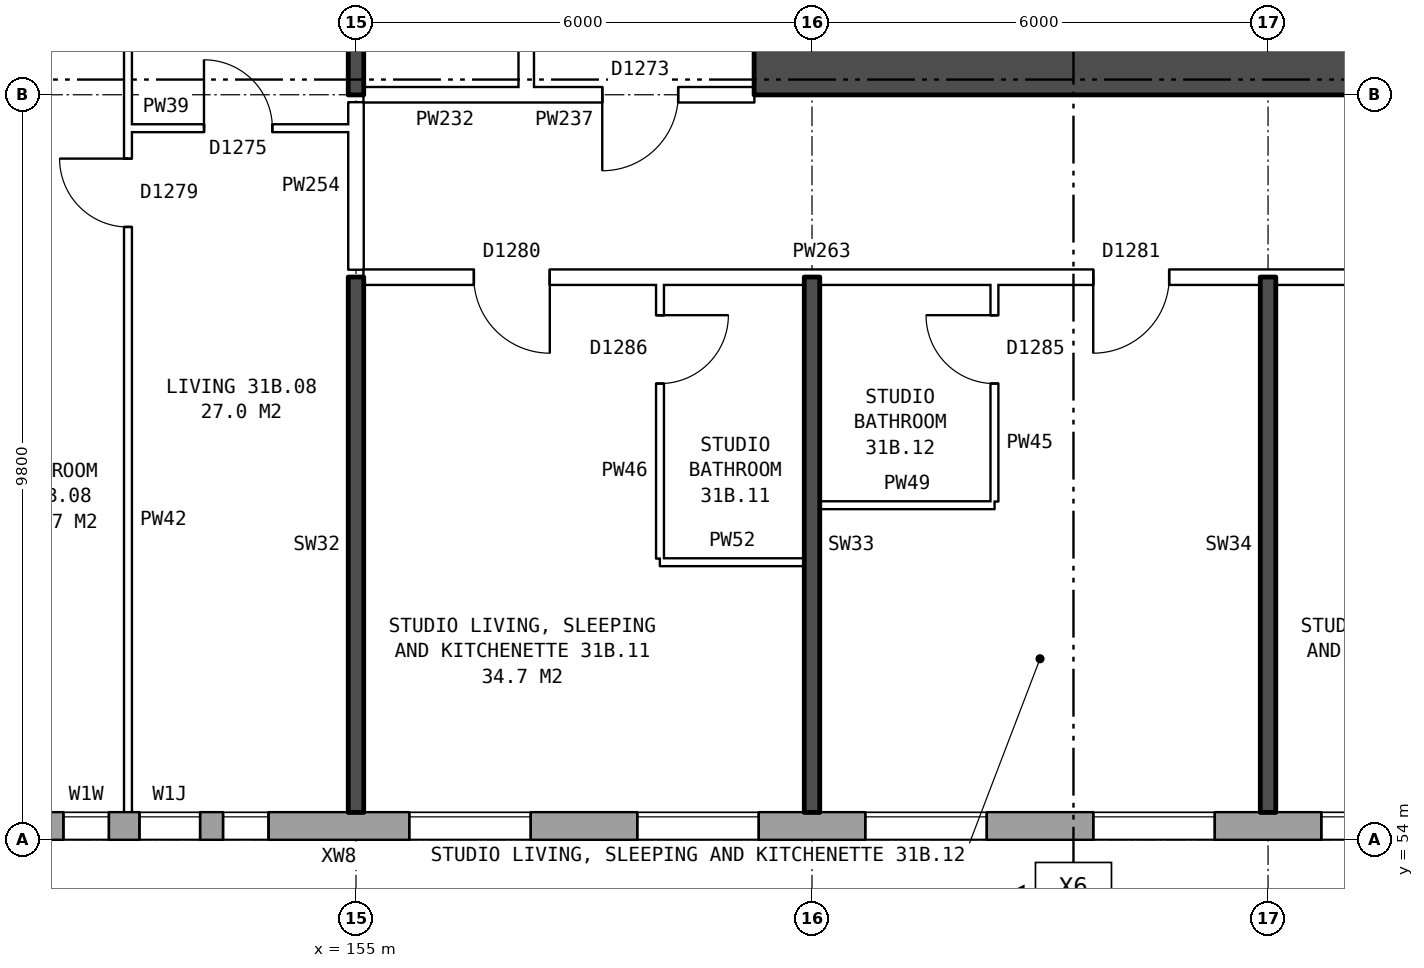
"""IFC4 building model, lengths in metres.
Left out: names, types, materials, properties, quantities, classifications, styles, units other than length and angle.
Written with IfcOpenShell. Run it as: python <this file> out.ifc"""

import sys

from ifc_helpers import new_model, si_unit, direction, frame, frame_2d, origin, place, context, subcontext, project, spatial, rectangle, extrude, element, fill, save


model = new_model("IFC4")
c1 = context("Model", 3, precision=1e-05, world=origin(), true_north=direction((0.0, 1.0)))
c2 = subcontext(c1, "Body", "Model", "MODEL_VIEW")
j1 = project(units=[si_unit("LENGTHUNIT", "METRE"), si_unit("PLANEANGLEUNIT", "RADIAN")], contexts=[c1])
p1 = place(None, origin())
s1 = spatial("IfcSite", under=j1, at=p1, CompositionType="ELEMENT")
p2 = place(p1, origin())
s2 = spatial("IfcBuilding", under=s1, at=p2, CompositionType="ELEMENT")
p3 = place(p2, frame((0.0, 0.0, 111.9)))
s3 = spatial("IfcBuildingStorey", under=s2, at=p3, CompositionType="ELEMENT", Elevation=111.9)
p4 = place(p3, frame((134.075, 54.18, 0.0), z_axis=(0.0, 0.0, 1.0), x_axis=(1.0, 0.0, 0.0)))
e1 = element("IfcWall", 1, at=p4, inside=s3, PredefinedType="STANDARD", context=c2, shape_type="SweptSolid", body=[
    extrude(rectangle(XDim=36.851, YDim=0.36, at=frame_2d((18.425, 0.0))), origin(), (0.0, 0.0, 1.0), 2.85),
])
p5 = place(p4, frame((0.625, 0.0, 0.8)))
e2 = element("IfcOpeningElement", 2, at=p5, cuts=e1, PredefinedType="OPENING", context=c2, shape_type="SweptSolid", body=[
    extrude(rectangle(XDim=1.6, YDim=1.8, at=frame_2d((0.8, 0.9))), frame((0.0, 0.19, 0.0), z_axis=(0.0, -1.0, 0.0), x_axis=(1.0, 0.0, 0.0)), (0.0, 0.0, 1.0), 0.38),
])
p6 = place(p4, frame((3.625, 0.0, 0.8)))
e3 = element("IfcOpeningElement", 3, at=p6, cuts=e1, PredefinedType="OPENING", context=c2, shape_type="SweptSolid", body=[
    extrude(rectangle(XDim=1.6, YDim=1.8, at=frame_2d((0.8, 0.9))), frame((0.0, 0.19, 0.0), z_axis=(0.0, -1.0, 0.0), x_axis=(1.0, 0.0, 0.0)), (0.0, 0.0, 1.0), 0.38),
])
p7 = place(p4, frame((6.625, 0.0, 0.8)))
e4 = element("IfcOpeningElement", 4, at=p7, cuts=e1, PredefinedType="OPENING", context=c2, shape_type="SweptSolid", body=[
    extrude(rectangle(XDim=1.6, YDim=1.8, at=frame_2d((0.8, 0.9))), frame((0.0, 0.19, 0.0), z_axis=(0.0, -1.0, 0.0), x_axis=(1.0, 0.0, 0.0)), (0.0, 0.0, 1.0), 0.38),
])
p8 = place(p4, frame((9.625, 0.0, 0.8)))
e5 = element("IfcOpeningElement", 5, at=p8, cuts=e1, PredefinedType="OPENING", context=c2, shape_type="SweptSolid", body=[
    extrude(rectangle(XDim=1.6, YDim=1.8, at=frame_2d((0.8, 0.9))), frame((0.0, 0.19, 0.0), z_axis=(0.0, -1.0, 0.0), x_axis=(1.0, 0.0, 0.0)), (0.0, 0.0, 1.0), 0.38),
])
p9 = place(p4, frame((12.625, 0.0, 0.8)))
e6 = element("IfcOpeningElement", 6, at=p9, cuts=e1, PredefinedType="OPENING", context=c2, shape_type="SweptSolid", body=[
    extrude(rectangle(XDim=1.6, YDim=1.8, at=frame_2d((0.8, 0.9))), frame((0.0, 0.19, 0.0), z_axis=(0.0, -1.0, 0.0), x_axis=(1.0, 0.0, 0.0)), (0.0, 0.0, 1.0), 0.38),
])
p10 = place(p4, frame((15.125, 0.0, 1.35)))
e7 = element("IfcOpeningElement", 7, at=p10, cuts=e1, PredefinedType="OPENING", context=c2, shape_type="SweptSolid", body=[
    extrude(rectangle(XDim=1.2, YDim=1.2, at=frame_2d((0.6, 0.6))), frame((0.0, 0.19, 0.0), z_axis=(0.0, -1.0, 0.0), x_axis=(1.0, 0.0, 0.0)), (0.0, 0.0, 1.0), 0.38),
])
p11 = place(p4, frame((18.075, 0.0, 0.25)))
e8 = element("IfcOpeningElement", 8, at=p11, cuts=e1, PredefinedType="OPENING", context=c2, shape_type="SweptSolid", body=[
    extrude(rectangle(XDim=0.8, YDim=1.5, at=frame_2d((0.4, 0.75))), frame((0.0, 0.19, 0.0), z_axis=(0.0, -1.0, 0.0), x_axis=(1.0, 0.0, 0.0)), (0.0, 0.0, 1.0), 0.38),
])
p12 = place(p4, frame((21.625, 0.0, 0.8)))
e9 = element("IfcOpeningElement", 9, at=p12, cuts=e1, PredefinedType="OPENING", context=c2, shape_type="SweptSolid", body=[
    extrude(rectangle(XDim=1.6, YDim=1.8, at=frame_2d((0.8, 0.9))), frame((0.0, 0.19, 0.0), z_axis=(0.0, -1.0, 0.0), x_axis=(1.0, 0.0, 0.0)), (0.0, 0.0, 1.0), 0.38),
])
p13 = place(p4, frame((24.625, 0.0, 0.8)))
e10 = element("IfcOpeningElement", 10, at=p13, cuts=e1, PredefinedType="OPENING", context=c2, shape_type="SweptSolid", body=[
    extrude(rectangle(XDim=1.6, YDim=1.8, at=frame_2d((0.8, 0.9))), frame((0.0, 0.19, 0.0), z_axis=(0.0, -1.0, 0.0), x_axis=(1.0, 0.0, 0.0)), (0.0, 0.0, 1.0), 0.38),
])
p14 = place(p4, frame((27.625, 0.0, 0.8)))
e11 = element("IfcOpeningElement", 11, at=p14, cuts=e1, PredefinedType="OPENING", context=c2, shape_type="SweptSolid", body=[
    extrude(rectangle(XDim=1.6, YDim=1.8, at=frame_2d((0.8, 0.9))), frame((0.0, 0.19, 0.0), z_axis=(0.0, -1.0, 0.0), x_axis=(1.0, 0.0, 0.0)), (0.0, 0.0, 1.0), 0.38),
])
p15 = place(p4, frame((30.625, 0.0, 0.8)))
e12 = element("IfcOpeningElement", 12, at=p15, cuts=e1, PredefinedType="OPENING", context=c2, shape_type="SweptSolid", body=[
    extrude(rectangle(XDim=1.6, YDim=1.8, at=frame_2d((0.8, 0.9))), frame((0.0, 0.19, 0.0), z_axis=(0.0, -1.0, 0.0), x_axis=(1.0, 0.0, 0.0)), (0.0, 0.0, 1.0), 0.38),
])
p16 = place(p4, frame((33.625, 0.0, 0.8)))
e13 = element("IfcOpeningElement", 13, at=p16, cuts=e1, PredefinedType="OPENING", context=c2, shape_type="SweptSolid", body=[
    extrude(rectangle(XDim=1.6, YDim=1.8, at=frame_2d((0.8, 0.9))), frame((0.0, 0.19, 0.0), z_axis=(0.0, -1.0, 0.0), x_axis=(1.0, 0.0, 0.0)), (0.0, 0.0, 1.0), 0.38),
])
p17 = place(p4, frame((17.075, 0.0, 0.15)))
e14 = element("IfcOpeningElement", 14, at=p17, cuts=e1, PredefinedType="OPENING", context=c2, shape_type="SweptSolid", body=[
    extrude(rectangle(XDim=0.6, YDim=0.9, at=frame_2d((0.3, 0.45))), frame((0.0, 0.19, 0.0), z_axis=(0.0, -1.0, 0.0), x_axis=(1.0, 0.0, 0.0)), (0.0, 0.0, 1.0), 0.38),
])
p18 = place(p4, frame((19.175, 0.0, 0.15)))
e15 = element("IfcOpeningElement", 15, at=p18, cuts=e1, PredefinedType="OPENING", context=c2, shape_type="SweptSolid", body=[
    extrude(rectangle(XDim=0.6, YDim=0.9, at=frame_2d((0.3, 0.45))), frame((0.0, 0.19, 0.0), z_axis=(0.0, -1.0, 0.0), x_axis=(1.0, 0.0, 0.0)), (0.0, 0.0, 1.0), 0.38),
])
p19 = place(p3, frame((160.24, 64.125, 0.0), z_axis=(0.0, 0.0, 1.0), x_axis=(1.0, 0.0, 0.0)))
e16 = element("IfcWall", 16, at=p19, inside=s3, PredefinedType="SHEAR", context=c2, shape_type="SweptSolid", body=[
    extrude(rectangle(XDim=8.4, YDim=0.65, at=frame_2d((4.2, 0.0))), origin(), (0.0, 0.0, 1.0), 2.85),
])
p20 = place(p3, frame((157.24, 63.9, 0.0), z_axis=(0.0, 0.0, 1.0), x_axis=(0.0, 1.0, 0.0)))
e17 = element("IfcWall", 17, at=p20, inside=s3, PredefinedType="PARTITIONING", context=c2, shape_type="SweptSolid", body=[
    extrude(rectangle(XDim=12.2, YDim=0.2, at=frame_2d((6.1, 0.0))), origin(), (0.0, 0.0, 1.0), 2.85),
])
p21 = place(p20, frame((5.1, 0.0, 0.0)))
e18 = element("IfcOpeningElement", 18, at=p21, cuts=e17, PredefinedType="OPENING", context=c2, shape_type="SweptSolid", body=[
    extrude(rectangle(XDim=2.0, YDim=2.1, at=frame_2d((1.0, 1.05))), frame((0.0, 0.11, 0.0), z_axis=(0.0, -1.0, 0.0), x_axis=(1.0, 0.0, 0.0)), (0.0, 0.0, 1.0), 0.22),
])
p22 = place(p3, frame((159.0, 57.65, 0.0), z_axis=(0.0, 0.0, 1.0), x_axis=(1.0, 0.0, 0.0)))
e19 = element("IfcWall", 19, at=p22, inside=s3, PredefinedType="PARTITIONING", context=c2, shape_type="SweptSolid", body=[
    extrude(rectangle(XDim=1.9, YDim=0.1, at=frame_2d((0.95, 0.0))), origin(), (0.0, 0.0, 1.0), 2.85),
])
p23 = place(p3, frame((161.1, 58.4, 0.0), z_axis=(0.0, 0.0, 1.0), x_axis=(1.0, 0.0, 0.0)))
e20 = element("IfcWall", 20, at=p23, inside=s3, PredefinedType="PARTITIONING", context=c2, shape_type="SweptSolid", body=[
    extrude(rectangle(XDim=2.3, YDim=0.1, at=frame_2d((1.15, 0.0))), origin(), (0.0, 0.0, 1.0), 2.85),
])
p24 = place(p3, frame((155.1, 61.4, 0.0), z_axis=(0.0, 0.0, 1.0), x_axis=(1.0, 0.0, 0.0)))
e21 = element("IfcWall", 21, at=p24, inside=s3, PredefinedType="PARTITIONING", context=c2, shape_type="SweptSolid", body=[
    extrude(rectangle(XDim=18.54, YDim=0.2, at=frame_2d((9.27, 0.0))), origin(), (0.0, 0.0, 1.0), 2.85),
])
p25 = place(p24, frame((1.45, 0.0, 0.0)))
e22 = element("IfcOpeningElement", 22, at=p25, cuts=e21, PredefinedType="OPENING", context=c2, shape_type="SweptSolid", body=[
    extrude(rectangle(XDim=1.0, YDim=2.1, at=frame_2d((0.5, 1.05))), frame((0.0, 0.11, 0.0), z_axis=(0.0, -1.0, 0.0), x_axis=(1.0, 0.0, 0.0)), (0.0, 0.0, 1.0), 0.22),
])
p26 = place(p24, frame((9.6, 0.0, 0.0)))
e23 = element("IfcOpeningElement", 23, at=p26, cuts=e21, PredefinedType="OPENING", context=c2, shape_type="SweptSolid", body=[
    extrude(rectangle(XDim=1.0, YDim=2.1, at=frame_2d((0.5, 1.05))), frame((0.0, 0.11, 0.0), z_axis=(0.0, -1.0, 0.0), x_axis=(1.0, 0.0, 0.0)), (0.0, 0.0, 1.0), 0.22),
])
p27 = place(p24, frame((13.4, 0.0, 0.0)))
e24 = element("IfcOpeningElement", 24, at=p27, cuts=e21, PredefinedType="OPENING", context=c2, shape_type="SweptSolid", body=[
    extrude(rectangle(XDim=1.0, YDim=2.1, at=frame_2d((0.5, 1.05))), frame((0.0, 0.11, 0.0), z_axis=(0.0, -1.0, 0.0), x_axis=(1.0, 0.0, 0.0)), (0.0, 0.0, 1.0), 0.22),
])
p28 = place(p3, frame((152.0, 63.36, 0.0), z_axis=(0.0, 0.0, 1.0), x_axis=(1.0, 0.0, 0.0)))
e25 = element("IfcWall", 25, at=p28, inside=s3, PredefinedType="PARTITIONING", context=c2, shape_type="SweptSolid", body=[
    extrude(rectangle(XDim=2.9, YDim=0.1, at=frame_2d((1.45, 0.0))), origin(), (0.0, 0.0, 1.0), 2.85),
])
p29 = place(p28, frame((1.0, 0.0, 0.0)))
e26 = element("IfcOpeningElement", 26, at=p29, cuts=e25, PredefinedType="OPENING", context=c2, shape_type="SweptSolid", body=[
    extrude(rectangle(XDim=0.9, YDim=2.1, at=frame_2d((0.45, 1.05))), frame((0.0, 0.06, 0.0), z_axis=(0.0, -1.0, 0.0), x_axis=(1.0, 0.0, 0.0)), (0.0, 0.0, 1.0), 0.12),
])
p30 = place(p3, frame((155.1, 63.8, 0.0), z_axis=(0.0, 0.0, 1.0), x_axis=(1.0, 0.0, 0.0)))
e27 = element("IfcWall", 27, at=p30, inside=s3, PredefinedType="PARTITIONING", context=c2, shape_type="SweptSolid", body=[
    extrude(rectangle(XDim=2.14, YDim=0.2, at=frame_2d((1.07, 0.0))), origin(), (0.0, 0.0, 1.0), 2.85),
])
p31 = place(p3, frame((157.24, 63.8, 0.0), z_axis=(0.0, 0.0, 1.0), x_axis=(1.0, 0.0, 0.0)))
e28 = element("IfcWall", 28, at=p31, inside=s3, PredefinedType="PARTITIONING", context=c2, shape_type="SweptSolid", body=[
    extrude(rectangle(XDim=3.0, YDim=0.2, at=frame_2d((1.5, 0.0))), origin(), (0.0, 0.0, 1.0), 2.85),
])
p32 = place(p31, frame((1.0, 0.0, 0.0)))
e29 = element("IfcOpeningElement", 29, at=p32, cuts=e28, PredefinedType="OPENING", context=c2, shape_type="SweptSolid", body=[
    extrude(rectangle(XDim=1.0, YDim=2.1, at=frame_2d((0.5, 1.05))), frame((0.0, 0.11, 0.0), z_axis=(0.0, -1.0, 0.0), x_axis=(1.0, 0.0, 0.0)), (0.0, 0.0, 1.0), 0.22),
])
p33 = place(p3, frame((152.0, 54.36, 0.0), z_axis=(0.0, 0.0, 1.0), x_axis=(0.0, 1.0, 0.0)))
e30 = element("IfcWall", 30, at=p33, inside=s3, PredefinedType="PARTITIONING", context=c2, shape_type="SweptSolid", body=[
    extrude(rectangle(XDim=14.34, YDim=0.1, at=frame_2d((7.17, 0.0))), origin(), (0.0, 0.0, 1.0), 2.85),
])
p34 = place(p33, frame((7.7, 0.0, 0.0)))
e31 = element("IfcOpeningElement", 31, at=p34, cuts=e30, PredefinedType="OPENING", context=c2, shape_type="SweptSolid", body=[
    extrude(rectangle(XDim=0.9, YDim=2.1, at=frame_2d((0.45, 1.05))), frame((0.0, 0.06, 0.0), z_axis=(0.0, -1.0, 0.0), x_axis=(1.0, 0.0, 0.0)), (0.0, 0.0, 1.0), 0.12),
])
p35 = place(p33, frame((13.04, 0.0, 0.0)))
e32 = element("IfcOpeningElement", 32, at=p35, cuts=e30, PredefinedType="OPENING", context=c2, shape_type="SweptSolid", body=[
    extrude(rectangle(XDim=0.9, YDim=2.1, at=frame_2d((0.45, 1.05))), frame((0.0, 0.06, 0.0), z_axis=(0.0, -1.0, 0.0), x_axis=(1.0, 0.0, 0.0)), (0.0, 0.0, 1.0), 0.12),
])
p36 = place(p3, frame((155.0, 54.36, 0.0), z_axis=(0.0, 0.0, 1.0), x_axis=(0.0, 1.0, 0.0)))
e33 = element("IfcWall", 33, at=p36, inside=s3, PredefinedType="SOLIDWALL", context=c2, shape_type="SweptSolid", body=[
    extrude(rectangle(XDim=7.04, YDim=0.2, at=frame_2d((3.52, 0.0))), origin(), (0.0, 0.0, 1.0), 2.85),
])
p37 = place(p3, frame((155.0, 61.5, 0.0), z_axis=(0.0, 0.0, 1.0), x_axis=(0.0, 1.0, 0.0)))
e34 = element("IfcWall", 34, at=p37, inside=s3, PredefinedType="PARTITIONING", context=c2, shape_type="SweptSolid", body=[
    extrude(rectangle(XDim=2.2, YDim=0.2, at=frame_2d((1.1, 0.0))), origin(), (0.0, 0.0, 1.0), 2.85),
])
p38 = place(p3, frame((155.0, 63.8, 0.0), z_axis=(0.0, 0.0, 1.0), x_axis=(0.0, 1.0, 0.0)))
e35 = element("IfcWall", 35, at=p38, inside=s3, PredefinedType="SOLIDWALL", context=c2, shape_type="SweptSolid", body=[
    extrude(rectangle(XDim=5.0, YDim=0.2, at=frame_2d((2.5, 0.0))), origin(), (0.0, 0.0, 1.0), 2.85),
])
p39 = place(p3, frame((159.0, 57.7, 0.0), z_axis=(0.0, 0.0, 1.0), x_axis=(0.0, 1.0, 0.0)))
e36 = element("IfcWall", 36, at=p39, inside=s3, PredefinedType="PARTITIONING", context=c2, shape_type="SweptSolid", body=[
    extrude(rectangle(XDim=3.6, YDim=0.1, at=frame_2d((1.8, 0.0))), origin(), (0.0, 0.0, 1.0), 2.85),
])
p40 = place(p39, frame((2.3, 0.0, 0.0)))
e37 = element("IfcOpeningElement", 37, at=p40, cuts=e36, PredefinedType="OPENING", context=c2, shape_type="SweptSolid", body=[
    extrude(rectangle(XDim=0.9, YDim=2.1, at=frame_2d((0.45, 1.05))), frame((0.0, 0.06, 0.0), z_axis=(0.0, -1.0, 0.0), x_axis=(1.0, 0.0, 0.0)), (0.0, 0.0, 1.0), 0.12),
])
p41 = place(p3, frame((161.0, 54.36, 0.0), z_axis=(0.0, 0.0, 1.0), x_axis=(0.0, 1.0, 0.0)))
e38 = element("IfcWall", 38, at=p41, inside=s3, PredefinedType="SOLIDWALL", context=c2, shape_type="SweptSolid", body=[
    extrude(rectangle(XDim=7.04, YDim=0.2, at=frame_2d((3.52, 0.0))), origin(), (0.0, 0.0, 1.0), 2.85),
])
p42 = place(p3, frame((163.4, 58.45, 0.0), z_axis=(0.0, 0.0, 1.0), x_axis=(0.0, 1.0, 0.0)))
e39 = element("IfcWall", 39, at=p42, inside=s3, PredefinedType="PARTITIONING", context=c2, shape_type="SweptSolid", body=[
    extrude(rectangle(XDim=2.85, YDim=0.1, at=frame_2d((1.425, 0.0))), origin(), (0.0, 0.0, 1.0), 2.85),
])
p43 = place(p42, frame((1.55, 0.0, 0.0)))
e40 = element("IfcOpeningElement", 40, at=p43, cuts=e39, PredefinedType="OPENING", context=c2, shape_type="SweptSolid", body=[
    extrude(rectangle(XDim=0.9, YDim=2.1, at=frame_2d((0.45, 1.05))), frame((0.0, 0.06, 0.0), z_axis=(0.0, -1.0, 0.0), x_axis=(1.0, 0.0, 0.0)), (0.0, 0.0, 1.0), 0.12),
])
p44 = place(p3, frame((167.0, 54.36, 0.0), z_axis=(0.0, 0.0, 1.0), x_axis=(0.0, 1.0, 0.0)))
e41 = element("IfcWall", 41, at=p44, inside=s3, PredefinedType="SOLIDWALL", context=c2, shape_type="SweptSolid", body=[
    extrude(rectangle(XDim=7.04, YDim=0.2, at=frame_2d((3.52, 0.0))), origin(), (0.0, 0.0, 1.0), 2.85),
])
p45 = place(p11, origin())
e42 = element("IfcWindow", 42, at=p45, inside=s3, PartitioningType="SINGLE_PANEL", PredefinedType="WINDOW", context=c2, shape_type="SweptSolid", body=[
    extrude(rectangle(XDim=0.8, YDim=1.5, at=frame_2d((0.4, 0.75))), frame((0.0, 0.15, 0.0), z_axis=(0.0, -1.0, 0.0), x_axis=(1.0, 0.0, 0.0)), (0.0, 0.0, 1.0), 0.06),
])
fill(e8, e42)
p46 = place(p12, origin())
e43 = element("IfcWindow", 43, at=p46, inside=s3, PartitioningType="SINGLE_PANEL", PredefinedType="WINDOW", context=c2, shape_type="SweptSolid", body=[
    extrude(rectangle(XDim=1.6, YDim=1.8, at=frame_2d((0.8, 0.9))), frame((0.0, 0.15, 0.0), z_axis=(0.0, -1.0, 0.0), x_axis=(1.0, 0.0, 0.0)), (0.0, 0.0, 1.0), 0.06),
])
fill(e9, e43)
p47 = place(p13, origin())
e44 = element("IfcWindow", 44, at=p47, inside=s3, PartitioningType="SINGLE_PANEL", PredefinedType="WINDOW", context=c2, shape_type="SweptSolid", body=[
    extrude(rectangle(XDim=1.6, YDim=1.8, at=frame_2d((0.8, 0.9))), frame((0.0, 0.15, 0.0), z_axis=(0.0, -1.0, 0.0), x_axis=(1.0, 0.0, 0.0)), (0.0, 0.0, 1.0), 0.06),
])
fill(e10, e44)
p48 = place(p14, origin())
e45 = element("IfcWindow", 45, at=p48, inside=s3, PartitioningType="SINGLE_PANEL", PredefinedType="WINDOW", context=c2, shape_type="SweptSolid", body=[
    extrude(rectangle(XDim=1.6, YDim=1.8, at=frame_2d((0.8, 0.9))), frame((0.0, 0.15, 0.0), z_axis=(0.0, -1.0, 0.0), x_axis=(1.0, 0.0, 0.0)), (0.0, 0.0, 1.0), 0.06),
])
fill(e11, e45)
p49 = place(p15, origin())
e46 = element("IfcWindow", 46, at=p49, inside=s3, PartitioningType="SINGLE_PANEL", PredefinedType="WINDOW", context=c2, shape_type="SweptSolid", body=[
    extrude(rectangle(XDim=1.6, YDim=1.8, at=frame_2d((0.8, 0.9))), frame((0.0, 0.15, 0.0), z_axis=(0.0, -1.0, 0.0), x_axis=(1.0, 0.0, 0.0)), (0.0, 0.0, 1.0), 0.06),
])
fill(e12, e46)
p50 = place(p16, origin())
e47 = element("IfcWindow", 47, at=p50, inside=s3, PartitioningType="SINGLE_PANEL", PredefinedType="WINDOW", context=c2, shape_type="SweptSolid", body=[
    extrude(rectangle(XDim=1.6, YDim=1.8, at=frame_2d((0.8, 0.9))), frame((0.0, 0.15, 0.0), z_axis=(0.0, -1.0, 0.0), x_axis=(1.0, 0.0, 0.0)), (0.0, 0.0, 1.0), 0.06),
])
fill(e13, e47)
p51 = place(p32, frame((1.0, 0.0, 0.0), z_axis=(0.0, 0.0, 1.0), x_axis=(-1.0, 0.0, 0.0)))
e48 = element("IfcDoor", 48, at=p51, inside=s3, OperationType="SINGLE_SWING_RIGHT", PredefinedType="DOOR", context=c2, shape_type="SweptSolid", body=[
    extrude(rectangle(XDim=1.0, YDim=2.1, at=frame_2d((0.5, 1.05))), frame((0.0, 0.025, 0.0), z_axis=(0.0, -1.0, 0.0), x_axis=(1.0, 0.0, 0.0)), (0.0, 0.0, 1.0), 0.05),
])
fill(e29, e48)
p52 = place(p34, origin())
e49 = element("IfcDoor", 49, at=p52, inside=s3, OperationType="SINGLE_SWING_RIGHT", PredefinedType="DOOR", context=c2, shape_type="SweptSolid", body=[
    extrude(rectangle(XDim=0.9, YDim=2.1, at=frame_2d((0.45, 1.05))), frame((0.0, 0.025, 0.0), z_axis=(0.0, -1.0, 0.0), x_axis=(1.0, 0.0, 0.0)), (0.0, 0.0, 1.0), 0.05),
])
fill(e31, e49)
p53 = place(p29, origin())
e50 = element("IfcDoor", 50, at=p53, inside=s3, OperationType="SINGLE_SWING_LEFT", PredefinedType="DOOR", context=c2, shape_type="SweptSolid", body=[
    extrude(rectangle(XDim=0.9, YDim=2.1, at=frame_2d((0.45, 1.05))), frame((0.0, 0.025, 0.0), z_axis=(0.0, -1.0, 0.0), x_axis=(1.0, 0.0, 0.0)), (0.0, 0.0, 1.0), 0.05),
])
fill(e26, e50)
p54 = place(p25, frame((1.0, 0.0, 0.0), z_axis=(0.0, 0.0, 1.0), x_axis=(-1.0, 0.0, 0.0)))
e51 = element("IfcDoor", 51, at=p54, inside=s3, OperationType="SINGLE_SWING_LEFT", PredefinedType="DOOR", context=c2, shape_type="SweptSolid", body=[
    extrude(rectangle(XDim=1.0, YDim=2.1, at=frame_2d((0.5, 1.05))), frame((0.0, 0.025, 0.0), z_axis=(0.0, -1.0, 0.0), x_axis=(1.0, 0.0, 0.0)), (0.0, 0.0, 1.0), 0.05),
])
fill(e22, e51)
p55 = place(p40, frame((0.9, 0.0, 0.0), z_axis=(0.0, 0.0, 1.0), x_axis=(-1.0, 0.0, 0.0)))
e52 = element("IfcDoor", 52, at=p55, inside=s3, OperationType="SINGLE_SWING_LEFT", PredefinedType="DOOR", context=c2, shape_type="SweptSolid", body=[
    extrude(rectangle(XDim=0.9, YDim=2.1, at=frame_2d((0.45, 1.05))), frame((0.0, 0.025, 0.0), z_axis=(0.0, -1.0, 0.0), x_axis=(1.0, 0.0, 0.0)), (0.0, 0.0, 1.0), 0.05),
])
fill(e37, e52)
p56 = place(p26, frame((1.0, 0.0, 0.0), z_axis=(0.0, 0.0, 1.0), x_axis=(-1.0, 0.0, 0.0)))
e53 = element("IfcDoor", 53, at=p56, inside=s3, OperationType="SINGLE_SWING_RIGHT", PredefinedType="DOOR", context=c2, shape_type="SweptSolid", body=[
    extrude(rectangle(XDim=1.0, YDim=2.1, at=frame_2d((0.5, 1.05))), frame((0.0, 0.025, 0.0), z_axis=(0.0, -1.0, 0.0), x_axis=(1.0, 0.0, 0.0)), (0.0, 0.0, 1.0), 0.05),
])
fill(e23, e53)
p57 = place(p43, origin())
e54 = element("IfcDoor", 54, at=p57, inside=s3, OperationType="SINGLE_SWING_RIGHT", PredefinedType="DOOR", context=c2, shape_type="SweptSolid", body=[
    extrude(rectangle(XDim=0.9, YDim=2.1, at=frame_2d((0.45, 1.05))), frame((0.0, 0.025, 0.0), z_axis=(0.0, -1.0, 0.0), x_axis=(1.0, 0.0, 0.0)), (0.0, 0.0, 1.0), 0.05),
])
fill(e40, e54)
p58 = place(p17, origin())
e55 = element("IfcWindow", 55, at=p58, inside=s3, PartitioningType="SINGLE_PANEL", PredefinedType="WINDOW", context=c2, shape_type="SweptSolid", body=[
    extrude(rectangle(XDim=0.6, YDim=0.9, at=frame_2d((0.3, 0.45))), frame((0.0, 0.15, 0.0), z_axis=(0.0, -1.0, 0.0), x_axis=(1.0, 0.0, 0.0)), (0.0, 0.0, 1.0), 0.06),
])
fill(e14, e55)
p59 = place(p18, origin())
e56 = element("IfcWindow", 56, at=p59, inside=s3, PartitioningType="SINGLE_PANEL", PredefinedType="WINDOW", context=c2, shape_type="SweptSolid", body=[
    extrude(rectangle(XDim=0.6, YDim=0.9, at=frame_2d((0.3, 0.45))), frame((0.0, 0.15, 0.0), z_axis=(0.0, -1.0, 0.0), x_axis=(1.0, 0.0, 0.0)), (0.0, 0.0, 1.0), 0.06),
])
fill(e15, e56)
save(model, sys.argv[1])
